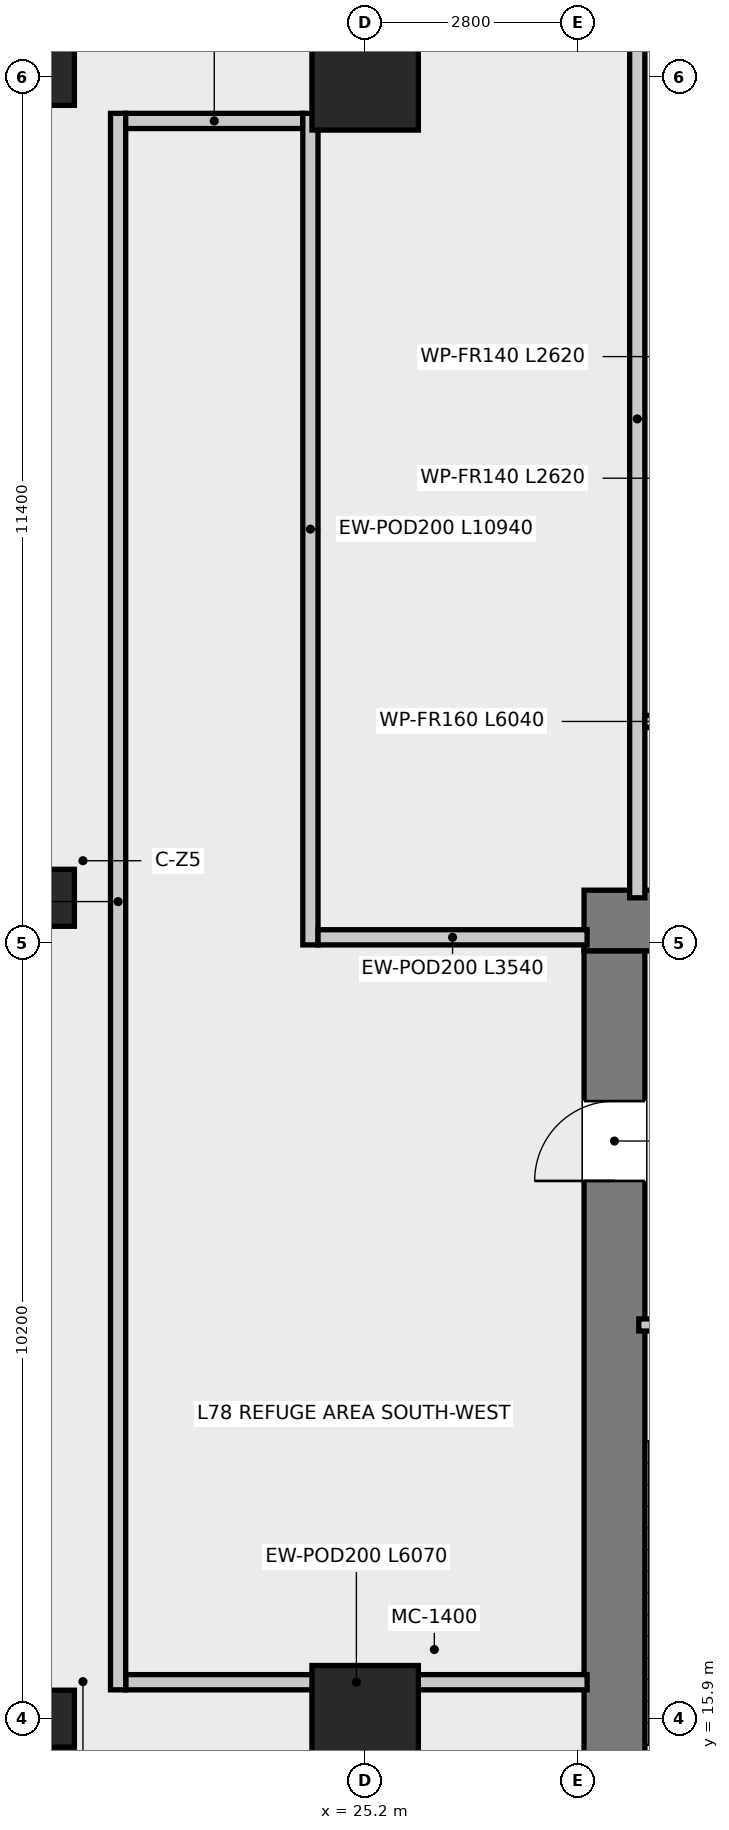
"""IFC4 building model, lengths in metres.
Left out: names, types, materials, properties, quantities, classifications, styles, units other than length and angle.
Written with IfcOpenShell. Run it as: python <this file> out.ifc"""

import sys

from ifc_helpers import new_model, si_unit, direction, frame, frame_2d, origin, origin_2d, place, context, subcontext, project, spatial, rectangle, extrude, source, transform, mapped, element, fill, save


model = new_model("IFC4")
c1 = context("Model", 3, precision=1e-05, world=origin(), true_north=direction((0.0, 1.0)))
c2 = subcontext(c1, "Body", "Model", "MODEL_VIEW")
j1 = project(units=[si_unit("LENGTHUNIT", "METRE"), si_unit("PLANEANGLEUNIT", "RADIAN")], contexts=[c1])
p1 = place(None, origin())
s1 = spatial("IfcSite", under=j1, at=p1, CompositionType="ELEMENT")
p2 = place(p1, origin())
s2 = spatial("IfcBuilding", under=s1, at=p2, CompositionType="ELEMENT")
p3 = place(p2, frame((0.0, 0.0, 318.75)))
s3 = spatial("IfcBuildingStorey", under=s2, at=p3, CompositionType="ELEMENT", Elevation=318.75)
p4 = place(p3, frame((28.08, 26.4, 0.0), z_axis=(0.0, 0.0, 1.0), x_axis=(1.0, 0.0, 0.0)))
e1 = element("IfcWall", 1, at=p4, inside=s3, PredefinedType="SHEAR", context=c2, shape_type="SweptSolid", body=[
    extrude(rectangle(XDim=15.84, YDim=0.8, at=frame_2d((7.92, 0.0))), origin(), (0.0, 0.0, 1.0), 5.0),
])
p5 = place(p4, frame((7.22, 0.0, 0.0)))
e2 = element("IfcOpeningElement", 2, at=p5, cuts=e1, PredefinedType="OPENING", context=c2, shape_type="SweptSolid", body=[
    extrude(rectangle(XDim=1.4, YDim=2.2, at=frame_2d((0.7, 1.1))), frame((0.0, 0.41, 0.0), z_axis=(0.0, -1.0, 0.0), x_axis=(1.0, 0.0, 0.0)), (0.0, 0.0, 1.0), 0.82),
])
p6 = place(p4, frame((1.775, 0.0, 0.0)))
e3 = element("IfcOpeningElement", 3, at=p6, cuts=e1, PredefinedType="OPENING", context=c2, shape_type="SweptSolid", body=[
    extrude(rectangle(XDim=1.05, YDim=2.1, at=frame_2d((0.525, 1.05))), frame((0.0, 0.41, 0.0), z_axis=(0.0, -1.0, 0.0), x_axis=(1.0, 0.0, 0.0)), (0.0, 0.0, 1.0), 0.82),
])
p7 = place(p4, frame((13.015, 0.0, 0.0)))
e4 = element("IfcOpeningElement", 4, at=p7, cuts=e1, PredefinedType="OPENING", context=c2, shape_type="SweptSolid", body=[
    extrude(rectangle(XDim=1.05, YDim=2.1, at=frame_2d((0.525, 1.05))), frame((0.0, 0.41, 0.0), z_axis=(0.0, -1.0, 0.0), x_axis=(1.0, 0.0, 0.0)), (0.0, 0.0, 1.0), 0.82),
])
p8 = place(p3, frame((28.48, 11.3, 0.0), z_axis=(0.0, 0.0, 1.0), x_axis=(0.0, 1.0, 0.0)))
e5 = element("IfcWall", 5, at=p8, inside=s3, PredefinedType="SHEAR", context=c2, shape_type="SweptSolid", body=[
    extrude(rectangle(XDim=14.7, YDim=0.8, at=frame_2d((7.35, 0.0))), origin(), (0.0, 0.0, 1.0), 5.0),
])
p9 = place(p8, frame((11.675, 0.0, 0.0)))
e6 = element("IfcOpeningElement", 6, at=p9, cuts=e5, PredefinedType="OPENING", context=c2, shape_type="SweptSolid", body=[
    extrude(rectangle(XDim=1.05, YDim=2.1, at=frame_2d((0.525, 1.05))), frame((0.0, 0.41, 0.0), z_axis=(0.0, -1.0, 0.0), x_axis=(1.0, 0.0, 0.0)), (0.0, 0.0, 1.0), 0.82),
])
m1 = source(origin(), c2, "Body", "SweptSolid", [
    extrude(rectangle(XDim=1.4, YDim=1.4, at=origin_2d()), origin(), (0.0, 0.0, 1.0), 5.0),
])
for number, where, z_axis, x_axis in (
    (7, (25.2, 15.9, 0.0), (0.0, 0.0, 1.0), (1.0, 0.0, 0.0)),
    (8, (25.2, 37.5, 0.0), (0.0, 0.0, 1.0), (1.0, 0.0, 0.0)),
):
    element("IfcColumn", number, at=place(p3, frame(where, z_axis=z_axis, x_axis=x_axis)), inside=s3, PredefinedType="USERDEFINED", context=c2, shape_type="MappedRepresentation", body=[
        mapped(m1, transform((0.0, 0.0, 0.0), x_axis=(1.0, 0.0, 0.0), y_axis=(0.0, 1.0, 0.0), z_axis=(0.0, 0.0, 1.0), scale=1.0)),
    ])
m2 = source(origin(), c2, "Body", "SweptSolid", [
    extrude(rectangle(XDim=0.75, YDim=0.75, at=origin_2d()), origin(), (0.0, 0.0, 1.0), 5.0),
])
for number, where, z_axis, x_axis in (
    (9, (21.0, 15.9, 0.0), (0.0, 0.0, 1.0), (1.0, 0.0, 0.0)),
    (10, (21.0, 26.7, 0.0), (0.0, 0.0, 1.0), (1.0, 0.0, 0.0)),
    (11, (21.0, 37.5, 0.0), (0.0, 0.0, 1.0), (1.0, 0.0, 0.0)),
):
    element("IfcColumn", number, at=place(p3, frame(where, z_axis=z_axis, x_axis=x_axis)), inside=s3, PredefinedType="COLUMN", context=c2, shape_type="MappedRepresentation", body=[
        mapped(m2, transform((0.0, 0.0, 0.0), x_axis=(1.0, 0.0, 0.0), y_axis=(0.0, 1.0, 0.0), z_axis=(0.0, 0.0, 1.0), scale=1.0)),
    ])
p10 = place(p3, frame((28.8, 21.08, 0.0), z_axis=(0.0, 0.0, 1.0), x_axis=(1.0, 0.0, 0.0)))
e12 = element("IfcWall", 12, at=p10, inside=s3, PredefinedType="PARTITIONING", context=c2, shape_type="SweptSolid", body=[
    extrude(rectangle(XDim=3.16, YDim=0.16, at=frame_2d((1.58, 0.0))), origin(), (0.0, 0.0, 1.0), 4.72),
])
p11 = place(p10, frame((1.055, 0.0, 0.0)))
e13 = element("IfcOpeningElement", 13, at=p11, cuts=e12, PredefinedType="OPENING", context=c2, shape_type="SweptSolid", body=[
    extrude(rectangle(XDim=1.05, YDim=2.1, at=frame_2d((0.525, 1.05))), frame((0.0, 0.09, 0.0), z_axis=(0.0, -1.0, 0.0), x_axis=(1.0, 0.0, 0.0)), (0.0, 0.0, 1.0), 0.18),
])
p12 = place(p3, frame((28.78, 26.7, 0.0), z_axis=(0.0, 0.0, 1.0), x_axis=(0.0, 1.0, 0.0)))
e14 = element("IfcWall", 14, at=p12, inside=s3, PredefinedType="SOLIDWALL", context=c2, shape_type="SweptSolid", body=[
    extrude(rectangle(XDim=12.6, YDim=0.2, at=frame_2d((6.3, 0.0))), origin(), (0.0, 0.0, 1.0), 4.18),
])
p13 = place(p3, frame((22.05, 16.38, 0.0), z_axis=(0.0, 0.0, 1.0), x_axis=(1.0, 0.0, 0.0)))
e15 = element("IfcWall", 15, at=p13, inside=s3, PredefinedType="SOLIDWALL", context=c2, shape_type="SweptSolid", body=[
    extrude(rectangle(XDim=6.07, YDim=0.2, at=frame_2d((3.035, 0.0))), origin(), (0.0, 0.0, 1.0), 4.18),
])
p14 = place(p3, frame((21.95, 16.28, 0.0), z_axis=(0.0, 0.0, 1.0), x_axis=(0.0, 1.0, 0.0)))
e16 = element("IfcWall", 16, at=p14, inside=s3, PredefinedType="SOLIDWALL", context=c2, shape_type="SweptSolid", body=[
    extrude(rectangle(XDim=20.74, YDim=0.2, at=frame_2d((10.37, 0.0))), origin(), (0.0, 0.0, 1.0), 4.23),
])
p15 = place(p3, frame((22.05, 36.92, 0.0), z_axis=(0.0, 0.0, 1.0), x_axis=(1.0, 0.0, 0.0)))
e17 = element("IfcWall", 17, at=p15, inside=s3, PredefinedType="SOLIDWALL", context=c2, shape_type="SweptSolid", body=[
    extrude(rectangle(XDim=2.33, YDim=0.2, at=frame_2d((1.165, 0.0))), origin(), (0.0, 0.0, 1.0), 4.72),
])
p16 = place(p3, frame((24.48, 26.08, 0.0), z_axis=(0.0, 0.0, 1.0), x_axis=(0.0, 1.0, 0.0)))
e18 = element("IfcWall", 18, at=p16, inside=s3, PredefinedType="SOLIDWALL", context=c2, shape_type="SweptSolid", body=[
    extrude(rectangle(XDim=10.94, YDim=0.2, at=frame_2d((5.47, 0.0))), origin(), (0.0, 0.0, 1.0), 4.23),
])
p17 = place(p3, frame((24.58, 26.18, 0.0), z_axis=(0.0, 0.0, 1.0), x_axis=(1.0, 0.0, 0.0)))
e19 = element("IfcWall", 19, at=p17, inside=s3, PredefinedType="SOLIDWALL", context=c2, shape_type="SweptSolid", body=[
    extrude(rectangle(XDim=3.54, YDim=0.2, at=frame_2d((1.77, 0.0))), origin(), (0.0, 0.0, 1.0), 4.18),
])
p18 = place(p3, frame((28.88, 29.02, 0.0), z_axis=(0.0, 0.0, 1.0), x_axis=(1.0, 0.0, 0.0)))
e20 = element("IfcWall", 20, at=p18, inside=s3, PredefinedType="PARTITIONING", context=c2, shape_type="SweptSolid", body=[
    extrude(rectangle(XDim=6.04, YDim=0.16, at=frame_2d((3.02, 0.0))), origin(), (0.0, 0.0, 1.0), 4.23),
])
p19 = place(p18, frame((1.145, 0.0, 0.0)))
e21 = element("IfcOpeningElement", 21, at=p19, cuts=e20, PredefinedType="OPENING", context=c2, shape_type="SweptSolid", body=[
    extrude(rectangle(XDim=1.05, YDim=2.1, at=frame_2d((0.525, 1.05))), frame((0.0, 0.09, 0.0), z_axis=(0.0, -1.0, 0.0), x_axis=(1.0, 0.0, 0.0)), (0.0, 0.0, 1.0), 0.18),
])
p20 = place(p9, origin())
e22 = element("IfcDoor", 22, at=p20, inside=s3, OperationType="SINGLE_SWING_LEFT", PredefinedType="DOOR", context=c2, shape_type="SweptSolid", body=[
    extrude(rectangle(XDim=1.05, YDim=2.1, at=frame_2d((0.525, 1.05))), frame((0.0, 0.025, 0.0), z_axis=(0.0, -1.0, 0.0), x_axis=(1.0, 0.0, 0.0)), (0.0, 0.0, 1.0), 0.05),
])
fill(e6, e22)
save(model, sys.argv[1])
